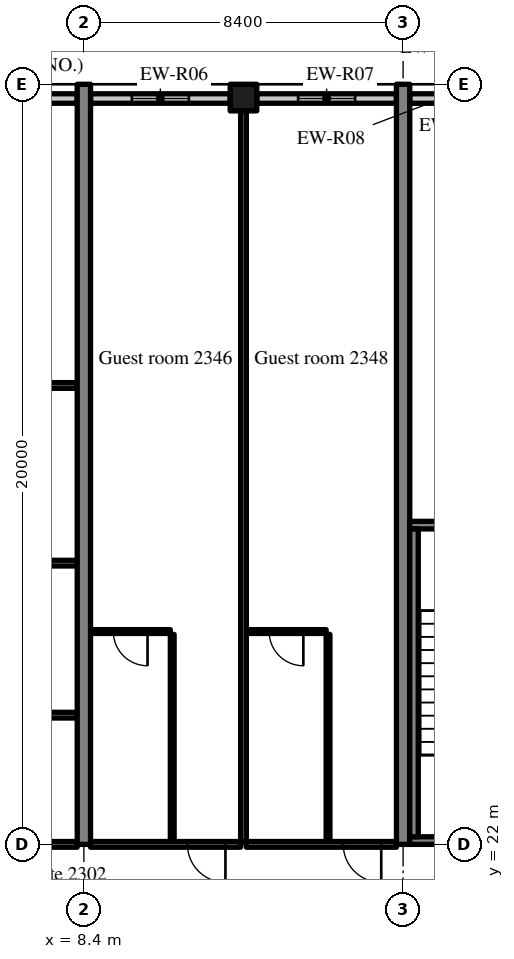
"""IFC4 building model, lengths in metres.
Left out: names, types, materials, properties, quantities, classifications, styles, units other than length and angle.
Written with IfcOpenShell. Run it as: python <this file> out.ifc"""

import sys

from ifc_helpers import new_model, si_unit, direction, frame, frame_2d, origin, origin_2d, place, context, subcontext, project, spatial, rectangle, extrude, source, transform, mapped, element, fill, save


model = new_model("IFC4")
c1 = context("Model", 3, precision=1e-05, world=origin(), true_north=direction((0.0, 1.0)))
c2 = subcontext(c1, "Body", "Model", "MODEL_VIEW")
j1 = project(units=[si_unit("LENGTHUNIT", "METRE"), si_unit("PLANEANGLEUNIT", "RADIAN")], contexts=[c1])
p1 = place(None, origin())
s1 = spatial("IfcSite", under=j1, at=p1, CompositionType="ELEMENT")
p2 = place(p1, origin())
s2 = spatial("IfcBuilding", under=s1, at=p2, CompositionType="ELEMENT")
p3 = place(p2, frame((0.0, 0.0, 99.0)))
s3 = spatial("IfcBuildingStorey", under=s2, at=p3, CompositionType="ELEMENT", Elevation=99.0)
m1 = source(origin(), c2, "Body", "SweptSolid", [
    extrude(rectangle(XDim=20.0, YDim=0.35, at=frame_2d((10.0, 0.0))), origin(), (0.0, 0.0, 1.0), 3.52),
])
for number, where, z_axis, x_axis in (
    (1, (8.4, 22.0, 0.0), (0.0, 0.0, 1.0), (0.0, 1.0, 0.0)),
    (2, (16.8, 22.0, 0.0), (0.0, 0.0, 1.0), (0.0, 1.0, 0.0)),
):
    element("IfcWall", number, at=place(p3, frame(where, z_axis=z_axis, x_axis=x_axis)), inside=s3, PredefinedType="SHEAR", context=c2, shape_type="MappedRepresentation", body=[
        mapped(m1, transform((0.0, 0.0, 0.0), scale=1.0)),
    ])
m2 = source(origin(), c2, "Body", "SweptSolid", [
    extrude(rectangle(XDim=0.7, YDim=0.7, at=origin_2d()), origin(), (0.0, 0.0, 1.0), 3.52),
])
p4 = place(p3, frame((12.6, 41.65, 0.0), z_axis=(0.0, 0.0, 1.0), x_axis=(1.0, 0.0, 0.0)))
e3 = element("IfcColumn", 3, at=p4, inside=s3, PredefinedType="COLUMN", context=c2, shape_type="MappedRepresentation", body=[
    mapped(m2, transform((0.0, 0.0, 0.0), scale=1.0)),
])
m3 = source(origin(), c2, "Body", "SweptSolid", [
    extrude(rectangle(XDim=4.07, YDim=0.25, at=frame_2d((2.035, 0.0))), origin(), (0.0, 0.0, 1.0), 2.82),
])
p5 = place(p3, frame((8.225, 41.625, 0.0), z_axis=(0.0, 0.0, 1.0), x_axis=(-1.0, 0.0, 0.0)))
e4 = element("IfcWall", 4, at=p5, inside=s3, PredefinedType="SOLIDWALL", context=c2, shape_type="MappedRepresentation", body=[
    mapped(m3, transform((0.0, 0.0, 0.0), scale=1.0)),
])
m4 = source(origin(), c2, "Body", "SweptSolid", [
    extrude(rectangle(XDim=1.5, YDim=1.5, at=frame_2d((0.75, 0.75))), frame((0.0, 0.135, 0.0), z_axis=(0.0, -1.0, 0.0), x_axis=(1.0, 0.0, 0.0)), (0.0, 0.0, 1.0), 0.27),
])
p6 = place(p5, frame((1.285, 0.0, 0.9)))
e5 = element("IfcOpeningElement", 5, at=p6, cuts=e4, PredefinedType="OPENING", context=c2, shape_type="MappedRepresentation", body=[
    mapped(m4, transform((0.0, 0.0, 0.0), scale=1.0)),
])
m5 = source(origin(), c2, "Body", "SweptSolid", [
    extrude(rectangle(XDim=3.675, YDim=0.25, at=frame_2d((1.837, 0.0))), origin(), (0.0, 0.0, 1.0), 2.82),
])
p7 = place(p3, frame((12.25, 41.625, 0.0), z_axis=(0.0, 0.0, 1.0), x_axis=(-1.0, 0.0, 0.0)))
e6 = element("IfcWall", 6, at=p7, inside=s3, PredefinedType="SOLIDWALL", context=c2, shape_type="MappedRepresentation", body=[
    mapped(m5, transform((0.0, 0.0, 0.0), scale=1.0)),
])
p8 = place(p7, frame((1.087, 0.0, 0.9)))
e7 = element("IfcOpeningElement", 7, at=p8, cuts=e6, PredefinedType="OPENING", context=c2, shape_type="MappedRepresentation", body=[
    mapped(m4, transform((0.0, 0.0, 0.0), scale=1.0)),
])
p9 = place(p3, frame((16.625, 41.625, 0.0), z_axis=(0.0, 0.0, 1.0), x_axis=(-1.0, 0.0, 0.0)))
e8 = element("IfcWall", 8, at=p9, inside=s3, PredefinedType="SOLIDWALL", context=c2, shape_type="MappedRepresentation", body=[
    mapped(m5, transform((0.0, 0.0, 0.0), scale=1.0)),
])
p10 = place(p9, frame((1.087, 0.0, 0.9)))
e9 = element("IfcOpeningElement", 9, at=p10, cuts=e8, PredefinedType="OPENING", context=c2, shape_type="MappedRepresentation", body=[
    mapped(m4, transform((0.0, 0.0, 0.0), scale=1.0)),
])
m6 = source(origin(), c2, "Body", "SweptSolid", [
    extrude(rectangle(XDim=1.683, YDim=0.25, at=frame_2d((0.841, 0.0))), origin(), (0.0, 0.0, 1.0), 2.82),
])
p11 = place(p3, frame((18.658, 41.625, 0.0), z_axis=(0.0, 0.0, 1.0), x_axis=(-1.0, 0.0, 0.0)))
e10 = element("IfcWall", 10, at=p11, inside=s3, PredefinedType="SOLIDWALL", context=c2, shape_type="MappedRepresentation", body=[
    mapped(m6, transform((0.0, 0.0, 0.0), scale=1.0)),
])
m7 = source(origin(), c2, "Body", "SweptSolid", [
    extrude(rectangle(XDim=8.225, YDim=0.2, at=frame_2d((4.112, 0.0))), origin(), (0.0, 0.0, 1.0), 3.52),
])
p12 = place(p3, frame((16.975, 22.1, 0.0), z_axis=(0.0, 0.0, 1.0), x_axis=(1.0, 0.0, 0.0)))
e11 = element("IfcWall", 11, at=p12, inside=s3, PredefinedType="SOLIDWALL", context=c2, shape_type="MappedRepresentation", body=[
    mapped(m7, transform((0.0, 0.0, 0.0), scale=1.0)),
])
m8 = source(origin(), c2, "Body", "SweptSolid", [
    extrude(rectangle(XDim=1.2, YDim=2.1, at=frame_2d((0.6, 1.05))), frame((0.0, 0.11, 0.0), z_axis=(0.0, -1.0, 0.0), x_axis=(1.0, 0.0, 0.0)), (0.0, 0.0, 1.0), 0.22),
])
p13 = place(p12, frame((6.025, 0.0, 0.0)))
e12 = element("IfcOpeningElement", 12, at=p13, cuts=e11, PredefinedType="OPENING", context=c2, shape_type="MappedRepresentation", body=[
    mapped(m8, transform((0.0, 0.0, 0.0), scale=1.0)),
])
p14 = place(p3, frame((16.975, 30.4, 0.0), z_axis=(0.0, 0.0, 1.0), x_axis=(1.0, 0.0, 0.0)))
e13 = element("IfcWall", 13, at=p14, inside=s3, PredefinedType="SOLIDWALL", context=c2, shape_type="MappedRepresentation", body=[
    mapped(m7, transform((0.0, 0.0, 0.0), scale=1.0)),
])
m9 = source(origin(), c2, "Body", "SweptSolid", [
    extrude(rectangle(XDim=1.0, YDim=2.1, at=frame_2d((0.5, 1.05))), frame((0.0, 0.11, 0.0), z_axis=(0.0, -1.0, 0.0), x_axis=(1.0, 0.0, 0.0)), (0.0, 0.0, 1.0), 0.22),
])
p15 = place(p14, frame((6.125, 0.0, 0.0)))
e14 = element("IfcOpeningElement", 14, at=p15, cuts=e13, PredefinedType="OPENING", context=c2, shape_type="MappedRepresentation", body=[
    mapped(m9, transform((0.0, 0.0, 0.0), scale=1.0)),
])
m10 = source(origin(), c2, "Body", "SweptSolid", [
    extrude(rectangle(XDim=8.1, YDim=0.225, at=frame_2d((4.05, 0.0))), origin(), (0.0, 0.0, 1.0), 3.52),
])
p16 = place(p3, frame((17.087, 22.2, 0.0), z_axis=(0.0, 0.0, 1.0), x_axis=(0.0, 1.0, 0.0)))
e15 = element("IfcWall", 15, at=p16, inside=s3, PredefinedType="SOLIDWALL", context=c2, shape_type="MappedRepresentation", body=[
    mapped(m10, transform((0.0, 0.0, 0.0), scale=1.0)),
])
m11 = source(origin(), c2, "Body", "SweptSolid", [
    extrude(rectangle(XDim=5.325, YDim=0.15, at=frame_2d((2.663, 0.0))), origin(), (0.0, 0.0, 1.0), 2.82),
])
p17 = place(p3, frame((2.9, 22.0, 0.0), z_axis=(0.0, 0.0, 1.0), x_axis=(1.0, 0.0, 0.0)))
e16 = element("IfcWall", 16, at=p17, inside=s3, PredefinedType="PARTITIONING", context=c2, shape_type="MappedRepresentation", body=[
    mapped(m11, transform((0.0, 0.0, 0.0), scale=1.0)),
])
m12 = source(origin(), c2, "Body", "SweptSolid", [
    extrude(rectangle(XDim=5.325, YDim=0.15, at=frame_2d((2.663, 0.0))), origin(), (0.0, 0.0, 1.0), 3.52),
])
for number, where, z_axis, x_axis in (
    (17, (2.9, 25.4, 0.0), (0.0, 0.0, 1.0), (1.0, 0.0, 0.0)),
    (18, (2.9, 29.4, 0.0), (0.0, 0.0, 1.0), (1.0, 0.0, 0.0)),
):
    element("IfcWall", number, at=place(p3, frame(where, z_axis=z_axis, x_axis=x_axis)), inside=s3, PredefinedType="PARTITIONING", context=c2, shape_type="MappedRepresentation", body=[
        mapped(m12, transform((0.0, 0.0, 0.0), scale=1.0)),
    ])
m13 = source(origin(), c2, "Body", "SweptSolid", [
    extrude(rectangle(XDim=7.875, YDim=0.15, at=frame_2d((3.938, 0.0))), origin(), (0.0, 0.0, 1.0), 3.52),
])
p18 = place(p3, frame((0.35, 34.075, 0.0), z_axis=(0.0, 0.0, 1.0), x_axis=(1.0, 0.0, 0.0)))
e19 = element("IfcWall", 19, at=p18, inside=s3, PredefinedType="PARTITIONING", context=c2, shape_type="MappedRepresentation", body=[
    mapped(m13, transform((0.0, 0.0, 0.0), scale=1.0)),
])
m14 = source(origin(), c2, "Body", "SweptSolid", [
    extrude(rectangle(XDim=1.0, YDim=2.1, at=frame_2d((0.5, 1.05))), frame((0.0, 0.085, 0.0), z_axis=(0.0, -1.0, 0.0), x_axis=(1.0, 0.0, 0.0)), (0.0, 0.0, 1.0), 0.17),
])
p19 = place(p18, frame((0.7, 0.0, 0.0)))
e20 = element("IfcOpeningElement", 20, at=p19, cuts=e19, PredefinedType="OPENING", context=c2, shape_type="MappedRepresentation", body=[
    mapped(m14, transform((0.0, 0.0, 0.0), scale=1.0)),
])
m15 = source(origin(), c2, "Body", "SweptSolid", [
    extrude(rectangle(XDim=5.45, YDim=0.1, at=frame_2d((2.725, 0.0))), origin(), (0.0, 0.0, 1.0), 3.52),
])
p20 = place(p3, frame((10.725, 22.075, 0.0), z_axis=(0.0, 0.0, 1.0), x_axis=(0.0, 1.0, 0.0)))
e21 = element("IfcWall", 21, at=p20, inside=s3, PredefinedType="PARTITIONING", context=c2, shape_type="MappedRepresentation", body=[
    mapped(m15, transform((0.0, 0.0, 0.0), scale=1.0)),
])
m16 = source(origin(), c2, "Body", "SweptSolid", [
    extrude(rectangle(XDim=2.1, YDim=0.1, at=frame_2d((1.05, 0.0))), origin(), (0.0, 0.0, 1.0), 3.52),
])
p21 = place(p3, frame((8.575, 27.6, 0.0), z_axis=(0.0, 0.0, 1.0), x_axis=(1.0, 0.0, 0.0)))
e22 = element("IfcWall", 22, at=p21, inside=s3, PredefinedType="PARTITIONING", context=c2, shape_type="MappedRepresentation", body=[
    mapped(m16, transform((0.0, 0.0, 0.0), scale=1.0)),
])
m17 = source(origin(), c2, "Body", "SweptSolid", [
    extrude(rectangle(XDim=0.9, YDim=2.1, at=frame_2d((0.45, 1.05))), frame((0.0, 0.06, 0.0), z_axis=(0.0, -1.0, 0.0), x_axis=(1.0, 0.0, 0.0)), (0.0, 0.0, 1.0), 0.12),
])
p22 = place(p21, frame((0.6, 0.0, 0.0)))
e23 = element("IfcOpeningElement", 23, at=p22, cuts=e22, PredefinedType="OPENING", context=c2, shape_type="MappedRepresentation", body=[
    mapped(m17, transform((0.0, 0.0, 0.0), scale=1.0)),
])
m18 = source(origin(), c2, "Body", "SweptSolid", [
    extrude(rectangle(XDim=3.95, YDim=0.15, at=frame_2d((1.975, 0.0))), origin(), (0.0, 0.0, 1.0), 2.82),
])
p23 = place(p3, frame((8.575, 22.0, 0.0), z_axis=(0.0, 0.0, 1.0), x_axis=(1.0, 0.0, 0.0)))
e24 = element("IfcWall", 24, at=p23, inside=s3, PredefinedType="PARTITIONING", context=c2, shape_type="MappedRepresentation", body=[
    mapped(m18, transform((0.0, 0.0, 0.0), scale=1.0)),
])
p24 = place(p23, frame((2.55, 0.0, 0.0)))
e25 = element("IfcOpeningElement", 25, at=p24, cuts=e24, PredefinedType="OPENING", context=c2, shape_type="MappedRepresentation", body=[
    mapped(m14, transform((0.0, 0.0, 0.0), scale=1.0)),
])
p25 = place(p3, frame((14.825, 22.075, 0.0), z_axis=(0.0, 0.0, 1.0), x_axis=(0.0, 1.0, 0.0)))
e26 = element("IfcWall", 26, at=p25, inside=s3, PredefinedType="PARTITIONING", context=c2, shape_type="MappedRepresentation", body=[
    mapped(m15, transform((0.0, 0.0, 0.0), scale=1.0)),
])
m19 = source(origin(), c2, "Body", "SweptSolid", [
    extrude(rectangle(XDim=2.1, YDim=0.1, at=frame_2d((1.05, 0.0))), origin(), (0.0, 0.0, 1.0), 3.52),
])
p26 = place(p3, frame((12.675, 27.6, 0.0), z_axis=(0.0, 0.0, 1.0), x_axis=(1.0, 0.0, 0.0)))
e27 = element("IfcWall", 27, at=p26, inside=s3, PredefinedType="PARTITIONING", context=c2, shape_type="MappedRepresentation", body=[
    mapped(m19, transform((0.0, 0.0, 0.0), scale=1.0)),
])
p27 = place(p26, frame((0.6, 0.0, 0.0)))
e28 = element("IfcOpeningElement", 28, at=p27, cuts=e27, PredefinedType="OPENING", context=c2, shape_type="MappedRepresentation", body=[
    mapped(m17, transform((0.0, 0.0, 0.0), scale=1.0)),
])
p28 = place(p3, frame((12.675, 22.0, 0.0), z_axis=(0.0, 0.0, 1.0), x_axis=(1.0, 0.0, 0.0)))
e29 = element("IfcWall", 29, at=p28, inside=s3, PredefinedType="PARTITIONING", context=c2, shape_type="MappedRepresentation", body=[
    mapped(m18, transform((0.0, 0.0, 0.0), scale=1.0)),
])
p29 = place(p28, frame((2.55, 0.0, 0.0)))
e30 = element("IfcOpeningElement", 30, at=p29, cuts=e29, PredefinedType="OPENING", context=c2, shape_type="MappedRepresentation", body=[
    mapped(m14, transform((0.0, 0.0, 0.0), scale=1.0)),
])
m20 = source(origin(), c2, "Body", "SweptSolid", [
    extrude(rectangle(XDim=19.225, YDim=0.15, at=frame_2d((9.613, 0.0))), origin(), (0.0, 0.0, 1.0), 3.52),
])
p30 = place(p3, frame((12.6, 22.075, 0.0), z_axis=(0.0, 0.0, 1.0), x_axis=(0.0, 1.0, 0.0)))
e31 = element("IfcWall", 31, at=p30, inside=s3, PredefinedType="PARTITIONING", context=c2, shape_type="MappedRepresentation", body=[
    mapped(m20, transform((0.0, 0.0, 0.0), scale=1.0)),
])
m21 = source(origin(), c2, "Body", "SweptSolid", [
    extrude(rectangle(XDim=1.5, YDim=1.5, at=frame_2d((0.75, 0.75))), frame((0.0, 0.03, 0.0), z_axis=(0.0, -1.0, 0.0), x_axis=(1.0, 0.0, 0.0)), (0.0, 0.0, 1.0), 0.06),
])
p31 = place(p8, origin())
e32 = element("IfcWindow", 32, at=p31, inside=s3, PartitioningType="SINGLE_PANEL", PredefinedType="WINDOW", context=c2, shape_type="MappedRepresentation", body=[
    mapped(m21, transform((0.0, 0.0, 0.0), scale=1.0)),
])
fill(e7, e32)
p32 = place(p10, origin())
e33 = element("IfcWindow", 33, at=p32, inside=s3, PartitioningType="SINGLE_PANEL", PredefinedType="WINDOW", context=c2, shape_type="MappedRepresentation", body=[
    mapped(m21, transform((0.0, 0.0, 0.0), scale=1.0)),
])
fill(e9, e33)
m22 = source(origin(), c2, "Body", "SweptSolid", [
    extrude(rectangle(XDim=0.9, YDim=2.1, at=frame_2d((0.45, 1.05))), frame((0.0, 0.025, 0.0), z_axis=(0.0, -1.0, 0.0), x_axis=(1.0, 0.0, 0.0)), (0.0, 0.0, 1.0), 0.05),
])
p33 = place(p22, origin())
e34 = element("IfcDoor", 34, at=p33, inside=s3, OperationType="SINGLE_SWING_RIGHT", PredefinedType="DOOR", context=c2, shape_type="MappedRepresentation", body=[
    mapped(m22, transform((0.0, 0.0, 0.0), scale=1.0)),
])
fill(e23, e34)
m23 = source(origin(), c2, "Body", "SweptSolid", [
    extrude(rectangle(XDim=1.0, YDim=2.1, at=frame_2d((0.5, 1.05))), frame((0.0, 0.025, 0.0), z_axis=(0.0, -1.0, 0.0), x_axis=(1.0, 0.0, 0.0)), (0.0, 0.0, 1.0), 0.05),
])
p34 = place(p24, origin())
e35 = element("IfcDoor", 35, at=p34, inside=s3, OperationType="SINGLE_SWING_RIGHT", PredefinedType="DOOR", context=c2, shape_type="MappedRepresentation", body=[
    mapped(m23, transform((0.0, 0.0, 0.0), scale=1.0)),
])
fill(e25, e35)
p35 = place(p27, origin())
e36 = element("IfcDoor", 36, at=p35, inside=s3, OperationType="SINGLE_SWING_RIGHT", PredefinedType="DOOR", context=c2, shape_type="MappedRepresentation", body=[
    mapped(m22, transform((0.0, 0.0, 0.0), scale=1.0)),
])
fill(e28, e36)
p36 = place(p29, origin())
e37 = element("IfcDoor", 37, at=p36, inside=s3, OperationType="SINGLE_SWING_RIGHT", PredefinedType="DOOR", context=c2, shape_type="MappedRepresentation", body=[
    mapped(m23, transform((0.0, 0.0, 0.0), scale=1.0)),
])
fill(e30, e37)
save(model, sys.argv[1])
